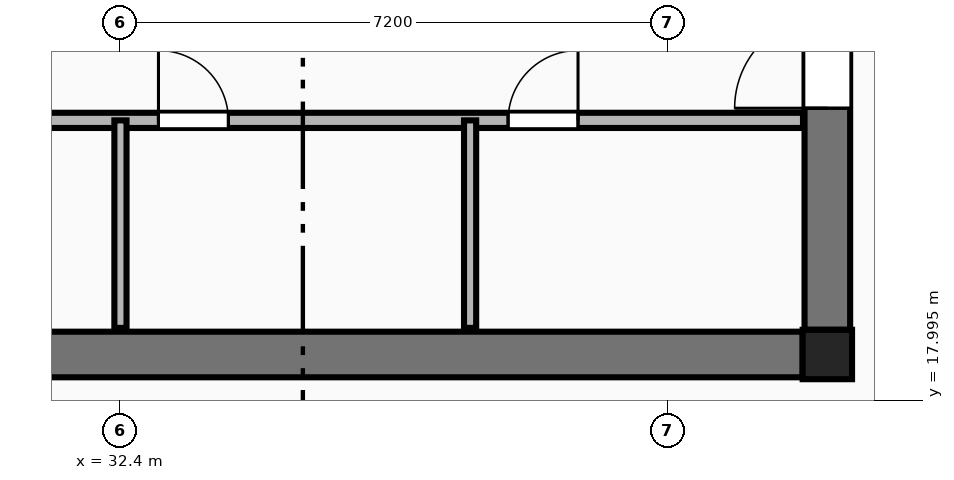
"""IFC4 building model, lengths in metres.
Left out: names, types, materials, properties, quantities, classifications, styles, units other than length and angle.
Written with IfcOpenShell. Run it as: python <this file> out.ifc"""

import sys

from ifc_helpers import new_model, si_unit, direction, frame, frame_2d, origin, origin_2d, place, context, subcontext, project, spatial, rectangle, extrude, element, fill, save


model = new_model("IFC4")
c1 = context("Model", 3, precision=1e-05, world=origin(), true_north=direction((0.0, 1.0)))
c2 = subcontext(c1, "Body", "Model", "MODEL_VIEW")
j1 = project(units=[si_unit("LENGTHUNIT", "METRE"), si_unit("PLANEANGLEUNIT", "RADIAN")], contexts=[c1])
p1 = place(None, origin())
s1 = spatial("IfcSite", under=j1, at=p1, CompositionType="ELEMENT")
p2 = place(p1, origin())
s2 = spatial("IfcBuilding", under=s1, at=p2, CompositionType="ELEMENT")
p3 = place(p2, frame((0.0, 0.0, 189.65)))
s3 = spatial("IfcBuildingStorey", under=s2, at=p3, CompositionType="ELEMENT", Elevation=189.65)
p4 = place(p3, frame((41.7, 18.6, 0.0), z_axis=(0.0, 0.0, 1.0), x_axis=(1.0, 0.0, 0.0)))
e1 = element("IfcColumn", 1, at=p4, inside=s3, PredefinedType="COLUMN", context=c2, shape_type="SweptSolid", body=[
    extrude(rectangle(XDim=0.65, YDim=0.65, at=origin_2d()), origin(), (0.0, 0.0, 1.0), 3.55),
])
p5 = place(p3, frame((23.425, 18.6, 0.0), z_axis=(0.0, 0.0, 1.0), x_axis=(1.0, 0.0, 0.0)))
e2 = element("IfcWall", 2, at=p5, inside=s3, PredefinedType="SHEAR", context=c2, shape_type="SweptSolid", body=[
    extrude(rectangle(XDim=17.95, YDim=0.6, at=frame_2d((8.975, 0.0))), origin(), (0.0, 0.0, 1.0), 3.35),
])
p6 = place(p3, frame((41.7, 18.925, 0.0), z_axis=(0.0, 0.0, 1.0), x_axis=(0.0, 1.0, 0.0)))
e3 = element("IfcWall", 3, at=p6, inside=s3, PredefinedType="SHEAR", context=c2, shape_type="SweptSolid", body=[
    extrude(rectangle(XDim=13.95, YDim=0.6, at=frame_2d((6.975, 0.0))), origin(), (0.0, 0.0, 1.0), 3.35),
])
p7 = place(p6, frame((2.915, 0.0, 0.0)))
e4 = element("IfcOpeningElement", 4, at=p7, cuts=e3, PredefinedType="OPENING", context=c2, shape_type="SweptSolid", body=[
    extrude(rectangle(XDim=1.22, YDim=2.25, at=frame_2d((0.61, 1.125))), frame((0.0, 0.31, 0.0), z_axis=(0.0, -1.0, 0.0), x_axis=(1.0, 0.0, 0.0)), (0.0, 0.0, 1.0), 0.62),
])
p8 = place(p3, frame((23.42, 21.68, 0.0), z_axis=(0.0, 0.0, 1.0), x_axis=(1.0, 0.0, 0.0)))
e5 = element("IfcWall", 5, at=p8, inside=s3, PredefinedType="PLUMBINGWALL", context=c2, shape_type="SweptSolid", body=[
    extrude(rectangle(XDim=17.96, YDim=0.2, at=frame_2d((8.98, 0.0))), origin(), (0.0, 0.0, 1.0), 3.35),
])
p9 = place(p8, frame((0.46, 0.0, 0.0)))
e6 = element("IfcOpeningElement", 6, at=p9, cuts=e5, PredefinedType="OPENING", context=c2, shape_type="SweptSolid", body=[
    extrude(rectangle(XDim=0.92, YDim=2.15, at=frame_2d((0.46, 1.075))), frame((0.0, 0.11, 0.0), z_axis=(0.0, -1.0, 0.0), x_axis=(1.0, 0.0, 0.0)), (0.0, 0.0, 1.0), 0.22),
])
p10 = place(p8, frame((4.78, 0.0, 0.0)))
e7 = element("IfcOpeningElement", 7, at=p10, cuts=e5, PredefinedType="OPENING", context=c2, shape_type="SweptSolid", body=[
    extrude(rectangle(XDim=0.92, YDim=2.15, at=frame_2d((0.46, 1.075))), frame((0.0, 0.11, 0.0), z_axis=(0.0, -1.0, 0.0), x_axis=(1.0, 0.0, 0.0)), (0.0, 0.0, 1.0), 0.22),
])
p11 = place(p8, frame((9.48, 0.0, 0.0)))
e8 = element("IfcOpeningElement", 8, at=p11, cuts=e5, PredefinedType="OPENING", context=c2, shape_type="SweptSolid", body=[
    extrude(rectangle(XDim=0.92, YDim=2.15, at=frame_2d((0.46, 1.075))), frame((0.0, 0.11, 0.0), z_axis=(0.0, -1.0, 0.0), x_axis=(1.0, 0.0, 0.0)), (0.0, 0.0, 1.0), 0.22),
])
p12 = place(p8, frame((14.08, 0.0, 0.0)))
e9 = element("IfcOpeningElement", 9, at=p12, cuts=e5, PredefinedType="OPENING", context=c2, shape_type="SweptSolid", body=[
    extrude(rectangle(XDim=0.92, YDim=2.15, at=frame_2d((0.46, 1.075))), frame((0.0, 0.11, 0.0), z_axis=(0.0, -1.0, 0.0), x_axis=(1.0, 0.0, 0.0)), (0.0, 0.0, 1.0), 0.22),
])
for number, where, z_axis, x_axis in (
    (10, (32.4, 18.95, 0.0), (0.0, 0.0, 1.0), (0.0, 1.0, 0.0)),
    (11, (37.0, 18.95, 0.0), (0.0, 0.0, 1.0), (0.0, 1.0, 0.0)),
):
    element("IfcWall", number, at=place(p3, frame(where, z_axis=z_axis, x_axis=x_axis)), inside=s3, PredefinedType="PARTITIONING", context=c2, shape_type="SweptSolid", body=[
        extrude(rectangle(XDim=2.73, YDim=0.16, at=frame_2d((1.365, 0.0))), origin(), (0.0, 0.0, 1.0), 3.35),
    ])
p13 = place(p7, origin())
e12 = element("IfcDoor", 12, at=p13, inside=s3, OperationType="SINGLE_SWING_LEFT", PredefinedType="DOOR", context=c2, shape_type="SweptSolid", body=[
    extrude(rectangle(XDim=1.22, YDim=2.25, at=frame_2d((0.61, 1.125))), frame((0.0, 0.025, 0.0), z_axis=(0.0, -1.0, 0.0), x_axis=(1.0, 0.0, 0.0)), (0.0, 0.0, 1.0), 0.05),
])
fill(e4, e12)
p14 = place(p11, origin())
e13 = element("IfcDoor", 13, at=p14, inside=s3, OperationType="SINGLE_SWING_LEFT", PredefinedType="DOOR", context=c2, shape_type="SweptSolid", body=[
    extrude(rectangle(XDim=0.92, YDim=2.15, at=frame_2d((0.46, 1.075))), frame((0.0, 0.025, 0.0), z_axis=(0.0, -1.0, 0.0), x_axis=(1.0, 0.0, 0.0)), (0.0, 0.0, 1.0), 0.05),
])
fill(e8, e13)
p15 = place(p12, origin())
e14 = element("IfcDoor", 14, at=p15, inside=s3, OperationType="SINGLE_SWING_RIGHT", PredefinedType="DOOR", context=c2, shape_type="SweptSolid", body=[
    extrude(rectangle(XDim=0.92, YDim=2.15, at=frame_2d((0.46, 1.075))), frame((0.0, 0.025, 0.0), z_axis=(0.0, -1.0, 0.0), x_axis=(1.0, 0.0, 0.0)), (0.0, 0.0, 1.0), 0.05),
])
fill(e9, e14)
save(model, sys.argv[1])
